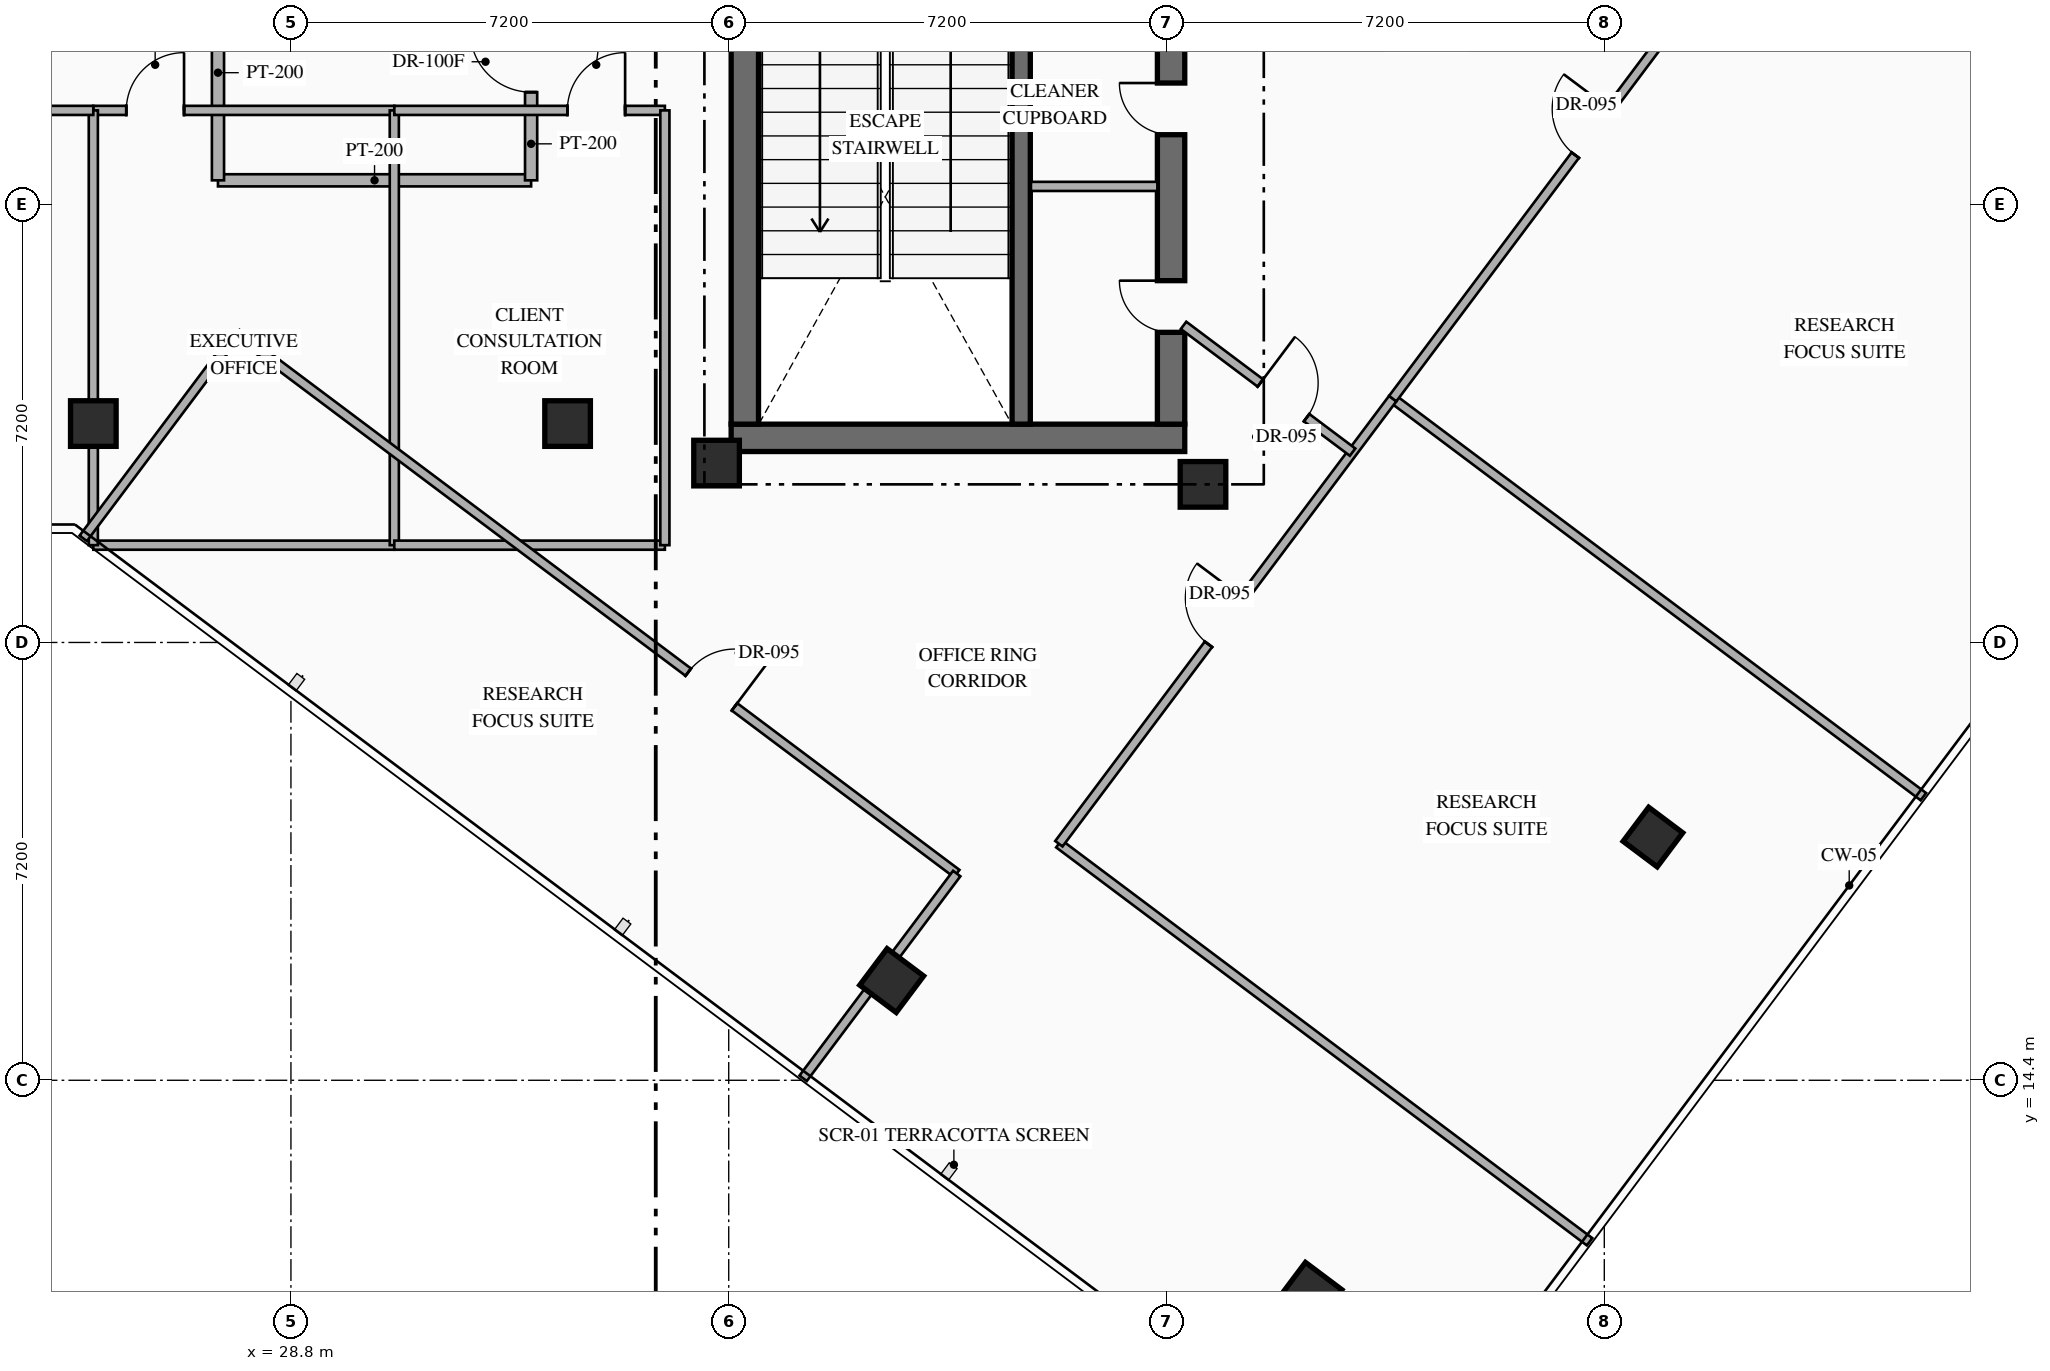
"""IFC4 building model, lengths in metres.
Left out: names, types, materials, properties, quantities, classifications, styles, units other than length and angle.
Written with IfcOpenShell. Run it as: python <this file> out.ifc"""

import sys

from ifc_helpers import new_model, si_unit, direction, frame, frame_2d, origin, origin_2d, place, context, subcontext, project, spatial, rectangle, hollow_rectangle, extrude, element, fill, save


model = new_model("IFC4")
c1 = context("Model", 3, precision=1e-05, world=origin(), true_north=direction((0.0, 1.0)))
c2 = subcontext(c1, "Body", "Model", "MODEL_VIEW")
j1 = project(units=[si_unit("LENGTHUNIT", "METRE"), si_unit("PLANEANGLEUNIT", "RADIAN")], contexts=[c1])
p1 = place(None, origin())
s1 = spatial("IfcSite", under=j1, at=p1, CompositionType="ELEMENT")
p2 = place(p1, origin())
s2 = spatial("IfcBuilding", under=s1, at=p2, CompositionType="ELEMENT")
p3 = place(p2, frame((0.0, 0.0, 186.75)))
s3 = spatial("IfcBuildingStorey", under=s2, at=p3, CompositionType="ELEMENT", Elevation=186.75)
p4 = place(p3, frame((36.04, 24.965, 0.0), z_axis=(0.0, 0.0, 1.0), x_axis=(1.0, 0.0, 0.0)))
e1 = element("IfcWall", 1, at=p4, inside=s3, PredefinedType="SHEAR", context=c2, shape_type="SweptSolid", body=[
    extrude(rectangle(XDim=7.46, YDim=0.45, at=frame_2d((3.73, 0.0))), origin(), (0.0, 0.0, 1.0), 4.8),
])
p5 = place(p3, frame((36.265, 25.19, 0.0), z_axis=(0.0, 0.0, 1.0), x_axis=(0.0, 1.0, 0.0)))
e2 = element("IfcWall", 2, at=p5, inside=s3, PredefinedType="SHEAR", context=c2, shape_type="SweptSolid", body=[
    extrude(rectangle(XDim=9.48, YDim=0.45, at=frame_2d((4.74, 0.0))), origin(), (0.0, 0.0, 1.0), 4.8),
])
p6 = place(p3, frame((43.275, 25.19, 0.0), z_axis=(0.0, 0.0, 1.0), x_axis=(0.0, 1.0, 0.0)))
e3 = element("IfcWall", 3, at=p6, inside=s3, PredefinedType="SHEAR", context=c2, shape_type="SweptSolid", body=[
    extrude(rectangle(XDim=9.48, YDim=0.45, at=frame_2d((4.74, 0.0))), origin(), (0.0, 0.0, 1.0), 4.8),
])
p7 = place(p6, frame((1.51, 0.0, 0.0)))
e4 = element("IfcOpeningElement", 4, at=p7, cuts=e3, PredefinedType="OPENING", context=c2, shape_type="SweptSolid", body=[
    extrude(rectangle(XDim=0.85, YDim=2.08, at=frame_2d((0.425, 1.04))), frame((0.0, 0.235, 0.0), z_axis=(0.0, -1.0, 0.0), x_axis=(1.0, 0.0, 0.0)), (0.0, 0.0, 1.0), 0.47),
])
p8 = place(p6, frame((4.76, 0.0, 0.0)))
e5 = element("IfcOpeningElement", 5, at=p8, cuts=e3, PredefinedType="OPENING", context=c2, shape_type="SweptSolid", body=[
    extrude(rectangle(XDim=0.85, YDim=2.08, at=frame_2d((0.425, 1.04))), frame((0.0, 0.235, 0.0), z_axis=(0.0, -1.0, 0.0), x_axis=(1.0, 0.0, 0.0)), (0.0, 0.0, 1.0), 0.47),
])
p9 = place(p3, frame((40.81, 25.19, 0.0), z_axis=(0.0, 0.0, 1.0), x_axis=(0.0, 1.0, 0.0)))
e6 = element("IfcWall", 6, at=p9, inside=s3, PredefinedType="SHEAR", context=c2, shape_type="SweptSolid", body=[
    extrude(rectangle(XDim=9.48, YDim=0.3, at=frame_2d((4.74, 0.0))), origin(), (0.0, 0.0, 1.0), 4.8),
])
for number, where, z_axis, x_axis in (
    (7, (35.8, 24.55, 0.0), (0.0, 0.0, 1.0), (1.0, 0.0, 0.0)),
    (8, (43.8, 24.2, 0.0), (0.0, 0.0, 1.0), (1.0, 0.0, 0.0)),
    (9, (25.55, 25.2, 0.0), (0.0, 0.0, 1.0), (1.0, 0.0, 0.0)),
    (10, (33.35, 25.2, 0.0), (0.0, 0.0, 1.0), (1.0, 0.0, 0.0)),
    (11, (38.68, 16.04, 0.0), (0.0, 0.0, 1.0), (0.8, -0.6, 0.0)),
    (12, (45.56, 10.88, 0.0), (0.0, 0.0, 1.0), (0.8, -0.6, 0.0)),
):
    element("IfcColumn", number, at=place(p3, frame(where, z_axis=z_axis, x_axis=x_axis)), inside=s3, PredefinedType="COLUMN", context=c2, shape_type="SweptSolid", body=[
        extrude(hollow_rectangle(XDim=0.75, YDim=0.75, WallThickness=0.028, at=origin_2d()), origin(), (0.0, 0.0, 1.0), 4.8),
    ])
p10 = place(p3, frame((51.2, 18.4, 0.0), z_axis=(0.0, 0.0, 1.0), x_axis=(0.799999996291, -0.600000004945, 0.0)))
e13 = element("IfcColumn", 13, at=p10, inside=s3, PredefinedType="COLUMN", context=c2, shape_type="SweptSolid", body=[
    extrude(hollow_rectangle(XDim=0.7, YDim=0.7, WallThickness=0.028, at=origin_2d()), origin(), (0.0, 0.0, 1.0), 4.8),
])
p11 = place(p3, frame((44.86, 40.73, 0.0), z_axis=(0.0, 0.0, 1.0), x_axis=(0.800007624502, -0.599989833863, 0.0)))
e14 = element("IfcWall", 14, at=p11, inside=s3, PredefinedType="STANDARD", context=c2, shape_type="SweptSolid", body=[
    extrude(rectangle(XDim=19.212, YDim=0.28, at=frame_2d((9.606, 0.0))), origin(), (0.0, 0.0, 1.0), 4.55),
])
p12 = place(p11, frame((1.755, 0.0, 0.0)))
e15 = element("IfcOpeningElement", 15, at=p12, cuts=e14, PredefinedType="OPENING", context=c2, shape_type="SweptSolid", body=[
    extrude(rectangle(XDim=1.1, YDim=2.2, at=frame_2d((0.55, 1.1))), frame((0.0, 0.15, 0.0), z_axis=(0.0, -1.0, 0.0), x_axis=(1.0, 0.0, 0.0)), (0.0, 0.0, 1.0), 0.3),
])
p13 = place(p11, frame((13.509, 0.0, 0.85)))
e16 = element("IfcOpeningElement", 16, at=p13, cuts=e14, PredefinedType="OPENING", context=c2, shape_type="SweptSolid", body=[
    extrude(rectangle(XDim=1.8, YDim=2.1, at=frame_2d((0.9, 1.05))), frame((0.0, 0.15, 0.0), z_axis=(0.0, -1.0, 0.0), x_axis=(1.0, 0.0, 0.0)), (0.0, 0.0, 1.0), 0.3),
])
p14 = place(p3, frame((40.97, 29.1, 0.0), z_axis=(0.0, 0.0, 1.0), x_axis=(1.0, 0.0, 0.0)))
e17 = element("IfcWall", 17, at=p14, inside=s3, PredefinedType="PARTITIONING", context=c2, shape_type="SweptSolid", body=[
    extrude(rectangle(XDim=2.08, YDim=0.15, at=frame_2d((1.04, 0.0))), origin(), (0.0, 0.0, 1.0), 4.55),
])
p15 = place(p3, frame((27.6, 29.2, 0.0), z_axis=(0.0, 0.0, 1.0), x_axis=(1.0, 0.0, 0.0)))
e18 = element("IfcWall", 18, at=p15, inside=s3, PredefinedType="STANDARD", context=c2, shape_type="SweptSolid", body=[
    extrude(rectangle(XDim=5.15, YDim=0.2, at=frame_2d((2.575, 0.0))), origin(), (0.0, 0.0, 1.0), 4.55),
])
p16 = place(p3, frame((27.6, 29.2, 0.0), z_axis=(0.0, 0.0, 1.0), x_axis=(0.0, 1.0, 0.0)))
e19 = element("IfcWall", 19, at=p16, inside=s3, PredefinedType="STANDARD", context=c2, shape_type="SweptSolid", body=[
    extrude(rectangle(XDim=3.54, YDim=0.2, at=frame_2d((1.77, 0.0))), origin(), (0.0, 0.0, 1.0), 4.55),
])
p17 = place(p3, frame((32.75, 29.2, 0.0), z_axis=(0.0, 0.0, 1.0), x_axis=(0.0, 1.0, 0.0)))
e20 = element("IfcWall", 20, at=p17, inside=s3, PredefinedType="STANDARD", context=c2, shape_type="SweptSolid", body=[
    extrude(rectangle(XDim=3.54, YDim=0.2, at=frame_2d((1.77, 0.0))), origin(), (0.0, 0.0, 1.0), 4.55),
])
p18 = place(p17, frame((1.45, 0.0, 0.0)))
e21 = element("IfcOpeningElement", 21, at=p18, cuts=e20, PredefinedType="OPENING", context=c2, shape_type="SweptSolid", body=[
    extrude(rectangle(XDim=1.0, YDim=2.2, at=frame_2d((0.5, 1.1))), frame((0.0, 0.11, 0.0), z_axis=(0.0, -1.0, 0.0), x_axis=(1.0, 0.0, 0.0)), (0.0, 0.0, 1.0), 0.22),
])
p19 = place(p3, frame((25.55, 23.2, 0.0), z_axis=(0.0, 0.0, 1.0), x_axis=(1.0, 0.0, 0.0)))
e22 = element("IfcWall", 22, at=p19, inside=s3, PredefinedType="PARTITIONING", context=c2, shape_type="SweptSolid", body=[
    extrude(rectangle(XDim=4.95, YDim=0.15, at=frame_2d((2.475, 0.0))), origin(), (0.0, 0.0, 1.0), 4.55),
])
p20 = place(p3, frame((25.55, 30.35, 0.0), z_axis=(0.0, 0.0, 1.0), x_axis=(1.0, 0.0, 0.0)))
e23 = element("IfcWall", 23, at=p20, inside=s3, PredefinedType="PARTITIONING", context=c2, shape_type="SweptSolid", body=[
    extrude(rectangle(XDim=4.95, YDim=0.15, at=frame_2d((2.475, 0.0))), origin(), (0.0, 0.0, 1.0), 4.55),
])
p21 = place(p20, frame((0.542, 0.0, 0.0)))
e24 = element("IfcOpeningElement", 24, at=p21, cuts=e23, PredefinedType="OPENING", context=c2, shape_type="SweptSolid", body=[
    extrude(rectangle(XDim=0.95, YDim=2.15, at=frame_2d((0.475, 1.075))), frame((0.0, 0.085, 0.0), z_axis=(0.0, -1.0, 0.0), x_axis=(1.0, 0.0, 0.0)), (0.0, 0.0, 1.0), 0.17),
])
p22 = place(p3, frame((25.55, 23.2, 0.0), z_axis=(0.0, 0.0, 1.0), x_axis=(0.0, 1.0, 0.0)))
e25 = element("IfcWall", 25, at=p22, inside=s3, PredefinedType="PARTITIONING", context=c2, shape_type="SweptSolid", body=[
    extrude(rectangle(XDim=7.15, YDim=0.15, at=frame_2d((3.575, 0.0))), origin(), (0.0, 0.0, 1.0), 3.745),
])
p23 = place(p3, frame((30.5, 23.2, 0.0), z_axis=(0.0, 0.0, 1.0), x_axis=(0.0, 1.0, 0.0)))
e26 = element("IfcWall", 26, at=p23, inside=s3, PredefinedType="PARTITIONING", context=c2, shape_type="SweptSolid", body=[
    extrude(rectangle(XDim=7.15, YDim=0.15, at=frame_2d((3.575, 0.0))), origin(), (0.0, 0.0, 1.0), 4.55),
])
p24 = place(p3, frame((30.5, 23.2, 0.0), z_axis=(0.0, 0.0, 1.0), x_axis=(1.0, 0.0, 0.0)))
e27 = element("IfcWall", 27, at=p24, inside=s3, PredefinedType="PARTITIONING", context=c2, shape_type="SweptSolid", body=[
    extrude(rectangle(XDim=4.45, YDim=0.15, at=frame_2d((2.225, 0.0))), origin(), (0.0, 0.0, 1.0), 4.55),
])
p25 = place(p3, frame((30.5, 30.35, 0.0), z_axis=(0.0, 0.0, 1.0), x_axis=(1.0, 0.0, 0.0)))
e28 = element("IfcWall", 28, at=p25, inside=s3, PredefinedType="PARTITIONING", context=c2, shape_type="SweptSolid", body=[
    extrude(rectangle(XDim=4.45, YDim=0.15, at=frame_2d((2.225, 0.0))), origin(), (0.0, 0.0, 1.0), 4.55),
])
p26 = place(p25, frame((2.846, 0.0, 0.0)))
e29 = element("IfcOpeningElement", 29, at=p26, cuts=e28, PredefinedType="OPENING", context=c2, shape_type="SweptSolid", body=[
    extrude(rectangle(XDim=0.95, YDim=2.15, at=frame_2d((0.475, 1.075))), frame((0.0, 0.085, 0.0), z_axis=(0.0, -1.0, 0.0), x_axis=(1.0, 0.0, 0.0)), (0.0, 0.0, 1.0), 0.17),
])
p27 = place(p3, frame((34.95, 23.2, 0.0), z_axis=(0.0, 0.0, 1.0), x_axis=(0.0, 1.0, 0.0)))
e30 = element("IfcWall", 30, at=p27, inside=s3, PredefinedType="PARTITIONING", context=c2, shape_type="SweptSolid", body=[
    extrude(rectangle(XDim=7.15, YDim=0.15, at=frame_2d((3.575, 0.0))), origin(), (0.0, 0.0, 1.0), 4.55),
])
for number, where, z_axis, x_axis in (
    (31, (41.43, 18.29, 0.0), (0.0, 0.0, 1.0), (0.8, -0.6, 0.0)),
    (32, (46.92, 25.61, 0.0), (0.0, 0.0, 1.0), (0.8, -0.6, 0.0)),
):
    element("IfcWall", number, at=place(p3, frame(where, z_axis=z_axis, x_axis=x_axis)), inside=s3, PredefinedType="PARTITIONING", context=c2, shape_type="SweptSolid", body=[
        extrude(rectangle(XDim=10.91, YDim=0.15, at=frame_2d((5.455, 0.0))), origin(), (0.0, 0.0, 1.0), 4.55),
    ])
p28 = place(p3, frame((41.43, 18.29, 0.0), z_axis=(0.0, 0.0, 1.0), x_axis=(0.599995730889, 0.800003201816, 0.0)))
e33 = element("IfcWall", 33, at=p28, inside=s3, PredefinedType="PARTITIONING", context=c2, shape_type="SweptSolid", body=[
    extrude(rectangle(XDim=9.15, YDim=0.15, at=frame_2d((4.575, 0.0))), origin(), (0.0, 0.0, 1.0), 4.55),
])
p29 = place(p28, frame((4.1, 0.0, 0.0)))
e34 = element("IfcOpeningElement", 34, at=p29, cuts=e33, PredefinedType="OPENING", context=c2, shape_type="SweptSolid", body=[
    extrude(rectangle(XDim=0.95, YDim=2.15, at=frame_2d((0.475, 1.075))), frame((0.0, 0.085, 0.0), z_axis=(0.0, -1.0, 0.0), x_axis=(1.0, 0.0, 0.0)), (0.0, 0.0, 1.0), 0.17),
])
p30 = place(p3, frame((46.92, 25.61, 0.0), z_axis=(0.0, 0.0, 1.0), x_axis=(0.600017820398, 0.799986634391, 0.0)))
e35 = element("IfcWall", 35, at=p30, inside=s3, PredefinedType="PARTITIONING", context=c2, shape_type="SweptSolid", body=[
    extrude(rectangle(XDim=10.96, YDim=0.15, at=frame_2d((5.48, 0.0))), origin(), (0.0, 0.0, 1.0), 4.55),
])
p31 = place(p30, frame((5.005, 0.0, 0.0)))
e36 = element("IfcOpeningElement", 36, at=p31, cuts=e35, PredefinedType="OPENING", context=c2, shape_type="SweptSolid", body=[
    extrude(rectangle(XDim=0.95, YDim=2.15, at=frame_2d((0.475, 1.075))), frame((0.0, 0.085, 0.0), z_axis=(0.0, -1.0, 0.0), x_axis=(1.0, 0.0, 0.0)), (0.0, 0.0, 1.0), 0.17),
])
p32 = place(p3, frame((43.48, 26.815, 0.0), z_axis=(0.0, 0.0, 1.0), x_axis=(0.800008430676, -0.599988758934, 0.0)))
e37 = element("IfcWall", 37, at=p32, inside=s3, PredefinedType="PARTITIONING", context=c2, shape_type="SweptSolid", body=[
    extrude(rectangle(XDim=3.475, YDim=0.15, at=frame_2d((1.738, 0.0))), origin(), (0.0, 0.0, 1.0), 4.55),
])
p33 = place(p32, frame((1.58, 0.0, 0.0)))
e38 = element("IfcOpeningElement", 38, at=p33, cuts=e37, PredefinedType="OPENING", context=c2, shape_type="SweptSolid", body=[
    extrude(rectangle(XDim=0.95, YDim=2.15, at=frame_2d((0.475, 1.075))), frame((0.0, 0.085, 0.0), z_axis=(0.0, -1.0, 0.0), x_axis=(1.0, 0.0, 0.0)), (0.0, 0.0, 1.0), 0.17),
])
p34 = place(p3, frame((22.25, 30.35, 0.0), z_axis=(0.0, 0.0, 1.0), x_axis=(1.0, 0.0, 0.0)))
e39 = element("IfcWall", 39, at=p34, inside=s3, PredefinedType="PARTITIONING", context=c2, shape_type="SweptSolid", body=[
    extrude(rectangle(XDim=3.3, YDim=0.15, at=frame_2d((1.65, 0.0))), origin(), (0.0, 0.0, 1.0), 4.55),
])
p35 = place(p34, frame((1.175, 0.0, 0.0)))
e40 = element("IfcOpeningElement", 40, at=p35, cuts=e39, PredefinedType="OPENING", context=c2, shape_type="SweptSolid", body=[
    extrude(rectangle(XDim=0.95, YDim=2.15, at=frame_2d((0.475, 1.075))), frame((0.0, 0.085, 0.0), z_axis=(0.0, -1.0, 0.0), x_axis=(1.0, 0.0, 0.0)), (0.0, 0.0, 1.0), 0.17),
])
p36 = place(p3, frame((27.91, 26.68, 0.0), z_axis=(0.0, 0.0, 1.0), x_axis=(0.800005938517, -0.599992081896, 0.0)))
e41 = element("IfcWall", 41, at=p36, inside=s3, PredefinedType="PARTITIONING", context=c2, shape_type="SweptSolid", body=[
    extrude(rectangle(XDim=14.8, YDim=0.15, at=frame_2d((7.4, 0.0))), origin(), (0.0, 0.0, 1.0), 4.55),
])
p37 = place(p36, frame((9.281, 0.0, 0.0)))
e42 = element("IfcOpeningElement", 42, at=p37, cuts=e41, PredefinedType="OPENING", context=c2, shape_type="SweptSolid", body=[
    extrude(rectangle(XDim=0.95, YDim=2.15, at=frame_2d((0.475, 1.075))), frame((0.0, 0.085, 0.0), z_axis=(0.0, -1.0, 0.0), x_axis=(1.0, 0.0, 0.0)), (0.0, 0.0, 1.0), 0.17),
])
p38 = place(p3, frame((25.384, 23.312, 0.0), z_axis=(0.0, 0.0, 1.0), x_axis=(0.599990721155, 0.80000695905, 0.0)))
e43 = element("IfcWall", 43, at=p38, inside=s3, PredefinedType="PARTITIONING", context=c2, shape_type="SweptSolid", body=[
    extrude(rectangle(XDim=4.21, YDim=0.15, at=frame_2d((2.105, 0.0))), origin(), (0.0, 0.0, 1.0), 4.55),
])
p39 = place(p3, frame((37.224, 14.432, 0.0), z_axis=(0.0, 0.0, 1.0), x_axis=(0.599962885857, 0.800027834262, 0.0)))
e44 = element("IfcWall", 44, at=p39, inside=s3, PredefinedType="PARTITIONING", context=c2, shape_type="SweptSolid", body=[
    extrude(rectangle(XDim=4.21, YDim=0.15, at=frame_2d((2.105, 0.0))), origin(), (0.0, 0.0, 1.0), 3.745),
])
p40 = place(p7, origin())
e45 = element("IfcDoor", 45, at=p40, inside=s3, OperationType="SINGLE_SWING_RIGHT", PredefinedType="DOOR", context=c2, shape_type="SweptSolid", body=[
    extrude(rectangle(XDim=0.85, YDim=2.08, at=frame_2d((0.425, 1.04))), frame((0.0, 0.025, 0.0), z_axis=(0.0, -1.0, 0.0), x_axis=(1.0, 0.0, 0.0)), (0.0, 0.0, 1.0), 0.05),
])
fill(e4, e45)
p41 = place(p8, origin())
e46 = element("IfcDoor", 46, at=p41, inside=s3, OperationType="SINGLE_SWING_RIGHT", PredefinedType="DOOR", context=c2, shape_type="SweptSolid", body=[
    extrude(rectangle(XDim=0.85, YDim=2.08, at=frame_2d((0.425, 1.04))), frame((0.0, 0.025, 0.0), z_axis=(0.0, -1.0, 0.0), x_axis=(1.0, 0.0, 0.0)), (0.0, 0.0, 1.0), 0.05),
])
fill(e5, e46)
p42 = place(p18, origin())
e47 = element("IfcDoor", 47, at=p42, inside=s3, OperationType="SINGLE_SWING_RIGHT", PredefinedType="DOOR", context=c2, shape_type="SweptSolid", body=[
    extrude(rectangle(XDim=1.0, YDim=2.2, at=frame_2d((0.5, 1.1))), frame((0.0, 0.025, 0.0), z_axis=(0.0, -1.0, 0.0), x_axis=(1.0, 0.0, 0.0)), (0.0, 0.0, 1.0), 0.05),
])
fill(e21, e47)
p43 = place(p21, origin())
e48 = element("IfcDoor", 48, at=p43, inside=s3, OperationType="SINGLE_SWING_RIGHT", PredefinedType="DOOR", context=c2, shape_type="SweptSolid", body=[
    extrude(rectangle(XDim=0.95, YDim=2.15, at=frame_2d((0.475, 1.075))), frame((0.0, 0.025, 0.0), z_axis=(0.0, -1.0, 0.0), x_axis=(1.0, 0.0, 0.0)), (0.0, 0.0, 1.0), 0.05),
])
fill(e24, e48)
p44 = place(p26, origin())
e49 = element("IfcDoor", 49, at=p44, inside=s3, OperationType="SINGLE_SWING_RIGHT", PredefinedType="DOOR", context=c2, shape_type="SweptSolid", body=[
    extrude(rectangle(XDim=0.95, YDim=2.15, at=frame_2d((0.475, 1.075))), frame((0.0, 0.025, 0.0), z_axis=(0.0, -1.0, 0.0), x_axis=(1.0, 0.0, 0.0)), (0.0, 0.0, 1.0), 0.05),
])
fill(e29, e49)
p45 = place(p29, origin())
e50 = element("IfcDoor", 50, at=p45, inside=s3, OperationType="SINGLE_SWING_RIGHT", PredefinedType="DOOR", context=c2, shape_type="SweptSolid", body=[
    extrude(rectangle(XDim=0.95, YDim=2.15, at=frame_2d((0.475, 1.075))), frame((0.0, 0.025, 0.0), z_axis=(0.0, -1.0, 0.0), x_axis=(1.0, 0.0, 0.0)), (0.0, 0.0, 1.0), 0.05),
])
fill(e34, e50)
p46 = place(p31, origin())
e51 = element("IfcDoor", 51, at=p46, inside=s3, OperationType="SINGLE_SWING_RIGHT", PredefinedType="DOOR", context=c2, shape_type="SweptSolid", body=[
    extrude(rectangle(XDim=0.95, YDim=2.15, at=frame_2d((0.475, 1.075))), frame((0.0, 0.025, 0.0), z_axis=(0.0, -1.0, 0.0), x_axis=(1.0, 0.0, 0.0)), (0.0, 0.0, 1.0), 0.05),
])
fill(e36, e51)
p47 = place(p33, origin())
e52 = element("IfcDoor", 52, at=p47, inside=s3, OperationType="SINGLE_SWING_LEFT", PredefinedType="DOOR", context=c2, shape_type="SweptSolid", body=[
    extrude(rectangle(XDim=0.95, YDim=2.15, at=frame_2d((0.475, 1.075))), frame((0.0, 0.025, 0.0), z_axis=(0.0, -1.0, 0.0), x_axis=(1.0, 0.0, 0.0)), (0.0, 0.0, 1.0), 0.05),
])
fill(e38, e52)
p48 = place(p37, origin())
e53 = element("IfcDoor", 53, at=p48, inside=s3, OperationType="SINGLE_SWING_RIGHT", PredefinedType="DOOR", context=c2, shape_type="SweptSolid", body=[
    extrude(rectangle(XDim=0.95, YDim=2.15, at=frame_2d((0.475, 1.075))), frame((0.0, 0.025, 0.0), z_axis=(0.0, -1.0, 0.0), x_axis=(1.0, 0.0, 0.0)), (0.0, 0.0, 1.0), 0.05),
])
fill(e42, e53)
save(model, sys.argv[1])
